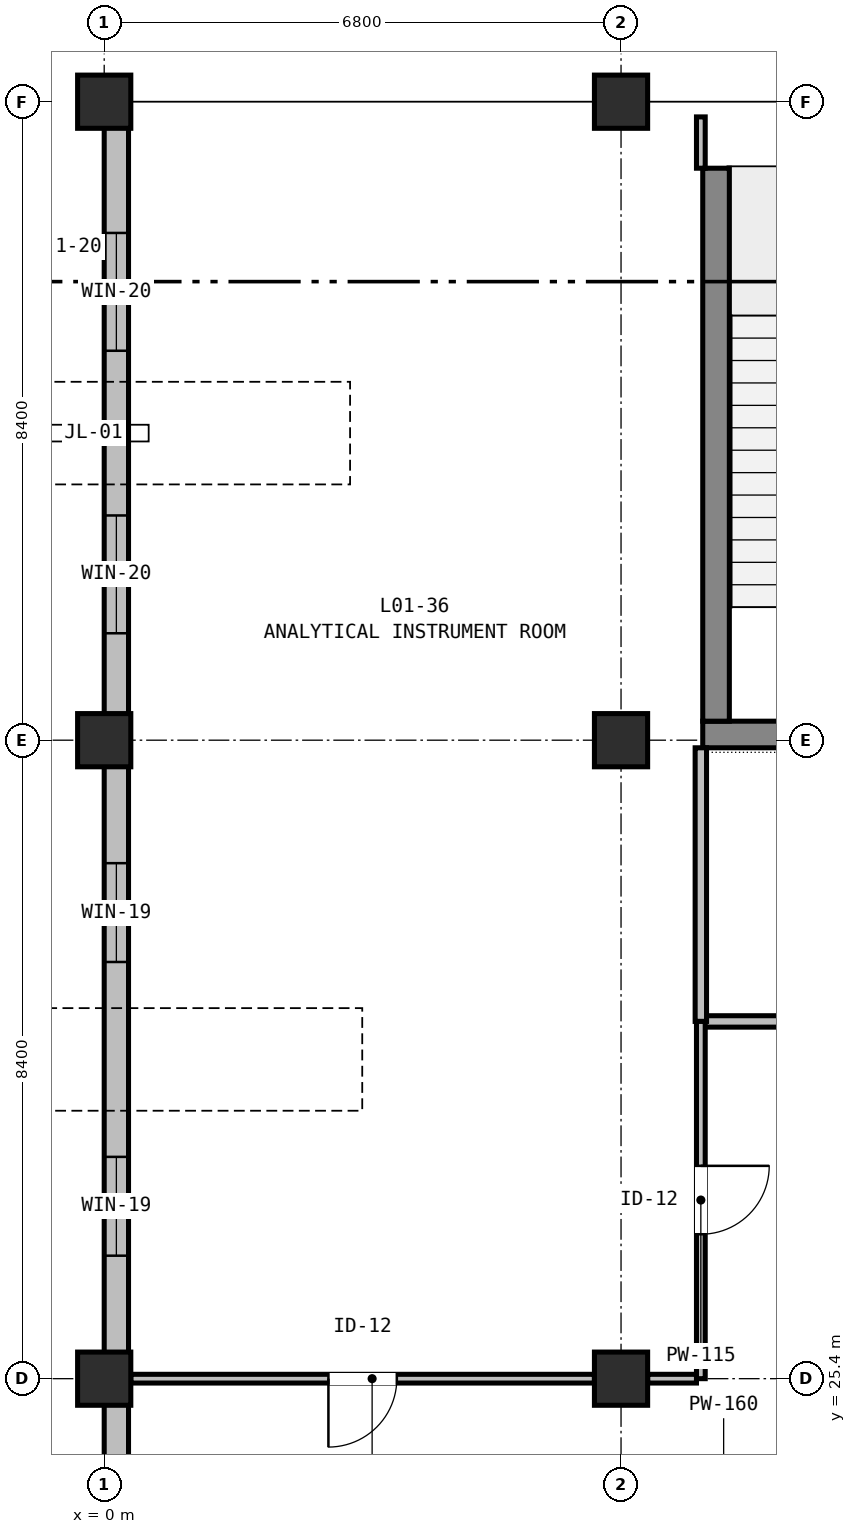
"""IFC4 building model, lengths in metres.
Left out: names, types, materials, properties, quantities, classifications, styles, units other than length and angle.
Written with IfcOpenShell. Run it as: python <this file> out.ifc"""

import sys

from ifc_helpers import new_model, si_unit, direction, frame, frame_2d, origin, origin_2d, place, context, subcontext, project, spatial, rectangle, extrude, element, fill, save


model = new_model("IFC4")
c1 = context("Model", 3, precision=1e-05, world=origin(), true_north=direction((0.0, 1.0)))
c2 = subcontext(c1, "Body", "Model", "MODEL_VIEW")
j1 = project(units=[si_unit("LENGTHUNIT", "METRE"), si_unit("PLANEANGLEUNIT", "RADIAN")], contexts=[c1])
p1 = place(None, origin())
s1 = spatial("IfcSite", under=j1, at=p1, CompositionType="ELEMENT")
p2 = place(p1, origin())
s2 = spatial("IfcBuilding", under=s1, at=p2, CompositionType="ELEMENT")
p3 = place(p2, frame((0.0, 0.0, 5.4)))
s3 = spatial("IfcBuildingStorey", under=s2, at=p3, CompositionType="ELEMENT", Elevation=5.4)
for number, where, z_axis, x_axis in (
    (1, (0.0, 25.4, 0.0), (0.0, 0.0, 1.0), (1.0, 0.0, 0.0)),
    (2, (0.0, 33.8, 0.0), (0.0, 0.0, 1.0), (1.0, 0.0, 0.0)),
    (3, (0.0, 42.2, 0.0), (0.0, 0.0, 1.0), (1.0, 0.0, 0.0)),
):
    element("IfcColumn", number, at=place(p3, frame(where, z_axis=z_axis, x_axis=x_axis)), inside=s3, PredefinedType="COLUMN", context=c2, shape_type="SweptSolid", body=[
        extrude(rectangle(XDim=0.7, YDim=0.7, at=origin_2d()), origin(), (0.0, 0.0, 1.0), 4.74),
    ])
for number, where, z_axis, x_axis in (
    (4, (6.8, 25.4, 0.0), (0.0, 0.0, 1.0), (1.0, 0.0, 0.0)),
    (5, (6.8, 33.8, 0.0), (0.0, 0.0, 1.0), (1.0, 0.0, 0.0)),
    (6, (6.8, 42.2, 0.0), (0.0, 0.0, 1.0), (1.0, 0.0, 0.0)),
):
    element("IfcColumn", number, at=place(p3, frame(where, z_axis=z_axis, x_axis=x_axis)), inside=s3, PredefinedType="COLUMN", context=c2, shape_type="SweptSolid", body=[
        extrude(rectangle(XDim=0.7, YDim=0.7, at=origin_2d()), origin(), (0.0, 0.0, 1.0), 4.8),
    ])
p4 = place(p3, frame((7.875, 33.875, 0.0), z_axis=(0.0, 0.0, 1.0), x_axis=(1.0, 0.0, 0.0)))
e7 = element("IfcWall", 7, at=p4, inside=s3, PredefinedType="SHEAR", context=c2, shape_type="SweptSolid", body=[
    extrude(rectangle(XDim=3.75, YDim=0.35, at=frame_2d((1.875, 0.0))), origin(), (0.0, 0.0, 1.0), 4.8),
])
p5 = place(p4, frame((1.3, 0.0, 0.0)))
e8 = element("IfcOpeningElement", 8, at=p5, cuts=e7, PredefinedType="OPENING", context=c2, shape_type="SweptSolid", body=[
    extrude(rectangle(XDim=1.15, YDim=2.15, at=frame_2d((0.575, 1.075))), frame((0.0, 0.185, 0.0), z_axis=(0.0, -1.0, 0.0), x_axis=(1.0, 0.0, 0.0)), (0.0, 0.0, 1.0), 0.37),
])
p6 = place(p3, frame((7.875, 41.5, 0.0), z_axis=(0.0, 0.0, 1.0), x_axis=(1.0, 0.0, 0.0)))
e9 = element("IfcWall", 9, at=p6, inside=s3, PredefinedType="SHEAR", context=c2, shape_type="SweptSolid", body=[
    extrude(rectangle(XDim=3.75, YDim=0.35, at=frame_2d((1.875, 0.0))), origin(), (0.0, 0.0, 1.0), 4.8),
])
p7 = place(p3, frame((8.05, 34.05, 0.0), z_axis=(0.0, 0.0, 1.0), x_axis=(0.0, 1.0, 0.0)))
e10 = element("IfcWall", 10, at=p7, inside=s3, PredefinedType="SHEAR", context=c2, shape_type="SweptSolid", body=[
    extrude(rectangle(XDim=7.275, YDim=0.35, at=frame_2d((3.637, 0.0))), origin(), (0.0, 0.0, 1.0), 4.8),
])
p8 = place(p3, frame((0.16, 17.0, 0.0), z_axis=(0.0, 0.0, 1.0), x_axis=(0.0, 1.0, 0.0)))
e11 = element("IfcWall", 11, at=p8, inside=s3, PredefinedType="STANDARD", context=c2, shape_type="SweptSolid", body=[
    extrude(rectangle(XDim=8.4, YDim=0.32, at=frame_2d((4.2, 0.0))), origin(), (0.0, 0.0, 1.0), 4.085),
])
p9 = place(p8, frame((1.093, 0.0, 0.9)))
e12 = element("IfcOpeningElement", 12, at=p9, cuts=e11, PredefinedType="OPENING", context=c2, shape_type="SweptSolid", body=[
    extrude(rectangle(XDim=2.35, YDim=1.5, at=frame_2d((1.175, 0.75))), frame((0.0, 0.17, 0.0), z_axis=(0.0, -1.0, 0.0), x_axis=(1.0, 0.0, 0.0)), (0.0, 0.0, 1.0), 0.34),
])
p10 = place(p3, frame((0.16, 25.4, 0.0), z_axis=(0.0, 0.0, 1.0), x_axis=(0.0, 1.0, 0.0)))
e13 = element("IfcWall", 13, at=p10, inside=s3, PredefinedType="STANDARD", context=c2, shape_type="SweptSolid", body=[
    extrude(rectangle(XDim=8.4, YDim=0.32, at=frame_2d((4.2, 0.0))), origin(), (0.0, 0.0, 1.0), 4.085),
])
p11 = place(p10, frame((1.618, 0.0, 0.75)))
e14 = element("IfcOpeningElement", 14, at=p11, cuts=e13, PredefinedType="OPENING", context=c2, shape_type="SweptSolid", body=[
    extrude(rectangle(XDim=1.3, YDim=2.4, at=frame_2d((0.65, 1.2))), frame((0.0, 0.17, 0.0), z_axis=(0.0, -1.0, 0.0), x_axis=(1.0, 0.0, 0.0)), (0.0, 0.0, 1.0), 0.34),
])
p12 = place(p10, frame((5.482, 0.0, 0.75)))
e15 = element("IfcOpeningElement", 15, at=p12, cuts=e13, PredefinedType="OPENING", context=c2, shape_type="SweptSolid", body=[
    extrude(rectangle(XDim=1.3, YDim=2.4, at=frame_2d((0.65, 1.2))), frame((0.0, 0.17, 0.0), z_axis=(0.0, -1.0, 0.0), x_axis=(1.0, 0.0, 0.0)), (0.0, 0.0, 1.0), 0.34),
])
p13 = place(p3, frame((0.16, 33.8, 0.0), z_axis=(0.0, 0.0, 1.0), x_axis=(0.0, 1.0, 0.0)))
e16 = element("IfcWall", 16, at=p13, inside=s3, PredefinedType="STANDARD", context=c2, shape_type="SweptSolid", body=[
    extrude(rectangle(XDim=8.08, YDim=0.32, at=frame_2d((4.04, 0.0))), origin(), (0.0, 0.0, 1.0), 4.085),
])
p14 = place(p13, frame((1.406, 0.0, 0.75)))
e17 = element("IfcOpeningElement", 17, at=p14, cuts=e16, PredefinedType="OPENING", context=c2, shape_type="SweptSolid", body=[
    extrude(rectangle(XDim=1.55, YDim=2.4, at=frame_2d((0.775, 1.2))), frame((0.0, 0.17, 0.0), z_axis=(0.0, -1.0, 0.0), x_axis=(1.0, 0.0, 0.0)), (0.0, 0.0, 1.0), 0.34),
])
p15 = place(p13, frame((5.123, 0.0, 0.75)))
e18 = element("IfcOpeningElement", 18, at=p15, cuts=e16, PredefinedType="OPENING", context=c2, shape_type="SweptSolid", body=[
    extrude(rectangle(XDim=1.55, YDim=2.4, at=frame_2d((0.775, 1.2))), frame((0.0, 0.17, 0.0), z_axis=(0.0, -1.0, 0.0), x_axis=(1.0, 0.0, 0.0)), (0.0, 0.0, 1.0), 0.34),
])
for number, where, z_axis, x_axis in (
    (19, (0.0, 42.04, 0.0), (0.0, 0.0, 1.0), (1.0, 0.0, 0.0)),
    (20, (6.28, 42.04, 0.0), (0.0, 0.0, 1.0), (1.0, 0.0, 0.0)),
    (21, (6.8, 42.04, 0.0), (0.0, 0.0, 1.0), (1.0, 0.0, 0.0)),
):
    element("IfcWall", number, at=place(p3, frame(where, z_axis=z_axis, x_axis=x_axis)), inside=s3, PredefinedType="STANDARD", context=c2, shape_type="SweptSolid", body=[
        extrude(rectangle(XDim=0.52, YDim=0.32, at=frame_2d((0.26, 0.0))), origin(), (0.0, 0.0, 1.0), 3.935),
    ])
p16 = place(p3, frame((11.65, 30.1, 0.0), z_axis=(0.0, 0.0, 1.0), x_axis=(-1.0, 0.0, 0.0)))
e22 = element("IfcWall", 22, at=p16, inside=s3, PredefinedType="PARTITIONING", context=c2, shape_type="SweptSolid", body=[
    extrude(rectangle(XDim=3.8, YDim=0.15, at=frame_2d((1.9, 0.0))), origin(), (0.0, 0.0, 1.0), 4.285),
])
p17 = place(p16, frame((1.4, 0.0, 0.0)))
e23 = element("IfcOpeningElement", 23, at=p17, cuts=e22, PredefinedType="OPENING", context=c2, shape_type="SweptSolid", body=[
    extrude(rectangle(XDim=1.0, YDim=2.1, at=frame_2d((0.5, 1.05))), frame((0.0, 0.085, 0.0), z_axis=(0.0, -1.0, 0.0), x_axis=(1.0, 0.0, 0.0)), (0.0, 0.0, 1.0), 0.17),
])
p18 = place(p3, frame((7.85, 30.1, 0.0), z_axis=(0.0, 0.0, 1.0), x_axis=(0.0, 1.0, 0.0)))
e24 = element("IfcWall", 24, at=p18, inside=s3, PredefinedType="PARTITIONING", context=c2, shape_type="SweptSolid", body=[
    extrude(rectangle(XDim=3.6, YDim=0.15, at=frame_2d((1.8, 0.0))), origin(), (0.0, 0.0, 1.0), 4.135),
])
p19 = place(p3, frame((7.85, 42.0, 0.0), z_axis=(0.0, 0.0, 1.0), x_axis=(0.0, -1.0, 0.0)))
e25 = element("IfcWall", 25, at=p19, inside=s3, PredefinedType="PARTITIONING", context=c2, shape_type="SweptSolid", body=[
    extrude(rectangle(XDim=0.675, YDim=0.115, at=frame_2d((0.337, 0.0))), origin(), (0.0, 0.0, 1.0), 4.085),
])
p20 = place(p3, frame((7.85, 30.1, 0.0), z_axis=(0.0, 0.0, 1.0), x_axis=(0.0, -1.0, 0.0)))
e26 = element("IfcWall", 26, at=p20, inside=s3, PredefinedType="PARTITIONING", context=c2, shape_type="SweptSolid", body=[
    extrude(rectangle(XDim=4.7, YDim=0.115, at=frame_2d((2.35, 0.0))), origin(), (0.0, 0.0, 1.0), 4.135),
])
p21 = place(p20, frame((1.9, 0.0, 0.0)))
e27 = element("IfcOpeningElement", 27, at=p21, cuts=e26, PredefinedType="OPENING", context=c2, shape_type="SweptSolid", body=[
    extrude(rectangle(XDim=0.9, YDim=2.1, at=frame_2d((0.45, 1.05))), frame((0.0, 0.067, 0.0), z_axis=(0.0, -1.0, 0.0), x_axis=(1.0, 0.0, 0.0)), (0.0, 0.0, 1.0), 0.135),
])
p22 = place(p3, frame((7.792, 25.4, 0.0), z_axis=(0.0, 0.0, 1.0), x_axis=(-1.0, 0.0, 0.0)))
e28 = element("IfcWall", 28, at=p22, inside=s3, PredefinedType="PARTITIONING", context=c2, shape_type="SweptSolid", body=[
    extrude(rectangle(XDim=0.643, YDim=0.115, at=frame_2d((0.321, 0.0))), origin(), (0.0, 0.0, 1.0), 4.135),
])
p23 = place(p3, frame((6.45, 25.4, 0.0), z_axis=(0.0, 0.0, 1.0), x_axis=(-1.0, 0.0, 0.0)))
e29 = element("IfcWall", 29, at=p23, inside=s3, PredefinedType="PARTITIONING", context=c2, shape_type="SweptSolid", body=[
    extrude(rectangle(XDim=6.1, YDim=0.115, at=frame_2d((3.05, 0.0))), origin(), (0.0, 0.0, 1.0), 4.135),
])
p24 = place(p23, frame((2.6, 0.0, 0.0)))
e30 = element("IfcOpeningElement", 30, at=p24, cuts=e29, PredefinedType="OPENING", context=c2, shape_type="SweptSolid", body=[
    extrude(rectangle(XDim=0.9, YDim=2.1, at=frame_2d((0.45, 1.05))), frame((0.0, 0.067, 0.0), z_axis=(0.0, -1.0, 0.0), x_axis=(1.0, 0.0, 0.0)), (0.0, 0.0, 1.0), 0.135),
])
p25 = place(p11, origin())
e31 = element("IfcWindow", 31, at=p25, inside=s3, PartitioningType="SINGLE_PANEL", PredefinedType="WINDOW", context=c2, shape_type="SweptSolid", body=[
    extrude(rectangle(XDim=1.3, YDim=2.4, at=frame_2d((0.65, 1.2))), frame((0.0, 0.03, 0.0), z_axis=(0.0, -1.0, 0.0), x_axis=(1.0, 0.0, 0.0)), (0.0, 0.0, 1.0), 0.06),
])
fill(e14, e31)
p26 = place(p12, origin())
e32 = element("IfcWindow", 32, at=p26, inside=s3, PartitioningType="SINGLE_PANEL", PredefinedType="WINDOW", context=c2, shape_type="SweptSolid", body=[
    extrude(rectangle(XDim=1.3, YDim=2.4, at=frame_2d((0.65, 1.2))), frame((0.0, 0.03, 0.0), z_axis=(0.0, -1.0, 0.0), x_axis=(1.0, 0.0, 0.0)), (0.0, 0.0, 1.0), 0.06),
])
fill(e15, e32)
p27 = place(p14, origin())
e33 = element("IfcWindow", 33, at=p27, inside=s3, PartitioningType="SINGLE_PANEL", PredefinedType="WINDOW", context=c2, shape_type="SweptSolid", body=[
    extrude(rectangle(XDim=1.55, YDim=2.4, at=frame_2d((0.775, 1.2))), frame((0.0, 0.03, 0.0), z_axis=(0.0, -1.0, 0.0), x_axis=(1.0, 0.0, 0.0)), (0.0, 0.0, 1.0), 0.06),
])
fill(e17, e33)
p28 = place(p15, origin())
e34 = element("IfcWindow", 34, at=p28, inside=s3, PartitioningType="SINGLE_PANEL", PredefinedType="WINDOW", context=c2, shape_type="SweptSolid", body=[
    extrude(rectangle(XDim=1.55, YDim=2.4, at=frame_2d((0.775, 1.2))), frame((0.0, 0.03, 0.0), z_axis=(0.0, -1.0, 0.0), x_axis=(1.0, 0.0, 0.0)), (0.0, 0.0, 1.0), 0.06),
])
fill(e18, e34)
p29 = place(p24, origin())
e35 = element("IfcDoor", 35, at=p29, inside=s3, OperationType="SINGLE_SWING_RIGHT", PredefinedType="DOOR", context=c2, shape_type="SweptSolid", body=[
    extrude(rectangle(XDim=0.9, YDim=2.1, at=frame_2d((0.45, 1.05))), frame((0.0, 0.025, 0.0), z_axis=(0.0, -1.0, 0.0), x_axis=(1.0, 0.0, 0.0)), (0.0, 0.0, 1.0), 0.05),
])
fill(e30, e35)
p30 = place(p21, origin())
e36 = element("IfcDoor", 36, at=p30, inside=s3, OperationType="SINGLE_SWING_LEFT", PredefinedType="DOOR", context=c2, shape_type="SweptSolid", body=[
    extrude(rectangle(XDim=0.9, YDim=2.1, at=frame_2d((0.45, 1.05))), frame((0.0, 0.025, 0.0), z_axis=(0.0, -1.0, 0.0), x_axis=(1.0, 0.0, 0.0)), (0.0, 0.0, 1.0), 0.05),
])
fill(e27, e36)
save(model, sys.argv[1])
